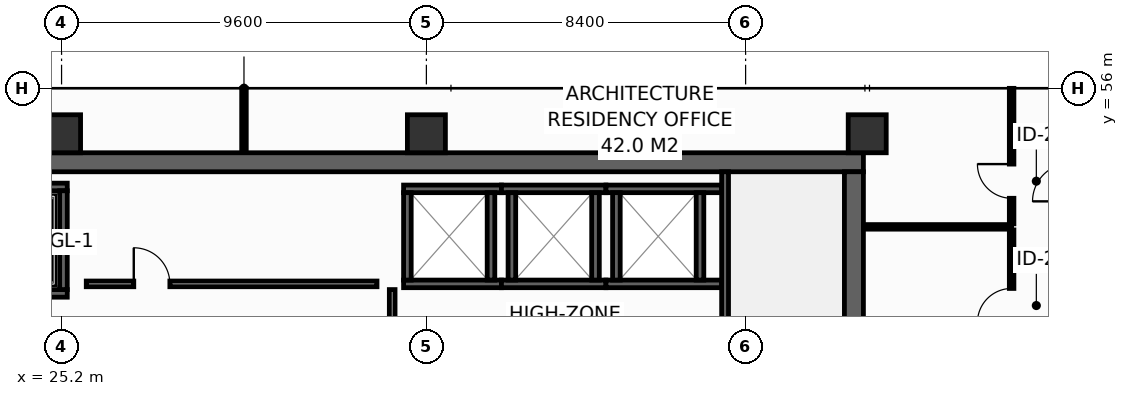
"""IFC4 building model, lengths in metres.
Left out: names, types, materials, properties, quantities, classifications, styles, units other than length and angle.
Written with IfcOpenShell. Run it as: python <this file> out.ifc"""

import sys

from ifc_helpers import new_model, si_unit, direction, frame, frame_2d, origin, origin_2d, place, context, subcontext, project, spatial, rectangle, hollow_rectangle, extrude, element, fill, save


model = new_model("IFC4")
c1 = context("Model", 3, precision=1e-05, world=origin(), true_north=direction((0.0, 1.0)))
c2 = subcontext(c1, "Body", "Model", "MODEL_VIEW")
j1 = project(units=[si_unit("LENGTHUNIT", "METRE"), si_unit("PLANEANGLEUNIT", "RADIAN")], contexts=[c1])
p1 = place(None, origin())
s1 = spatial("IfcSite", under=j1, at=p1, CompositionType="ELEMENT")
p2 = place(p1, origin())
s2 = spatial("IfcBuilding", under=s1, at=p2, CompositionType="ELEMENT")
p3 = place(p2, frame((0.0, 0.0, 160.0)))
s3 = spatial("IfcBuildingStorey", under=s2, at=p3, CompositionType="ELEMENT", Elevation=160.0)
p4 = place(p3, frame((13.6, 54.05, 0.0), z_axis=(0.0, 0.0, 1.0), x_axis=(1.0, 0.0, 0.0)))
e1 = element("IfcWall", 1, at=p4, inside=s3, PredefinedType="SHEAR", context=c2, shape_type="SweptSolid", body=[
    extrude(rectangle(XDim=32.7, YDim=0.5, at=frame_2d((16.35, 0.0))), origin(), (0.0, 0.0, 1.0), 3.55),
])
p5 = place(p3, frame((46.05, 43.4, 0.0), z_axis=(0.0, 0.0, 1.0), x_axis=(0.0, 1.0, 0.0)))
e2 = element("IfcWall", 2, at=p5, inside=s3, PredefinedType="SHEAR", context=c2, shape_type="SweptSolid", body=[
    extrude(rectangle(XDim=10.4, YDim=0.5, at=frame_2d((5.2, 0.0))), origin(), (0.0, 0.0, 1.0), 3.55),
])
for number, where, z_axis, x_axis in (
    (3, (25.2, 54.8, 0.0), (0.0, 0.0, 1.0), (1.0, 0.0, 0.0)),
    (4, (34.8, 54.8, 0.0), (0.0, 0.0, 1.0), (1.0, 0.0, 0.0)),
    (5, (46.4, 54.8, 0.0), (0.0, 0.0, 1.0), (1.0, 0.0, 0.0)),
):
    element("IfcColumn", number, at=place(p3, frame(where, z_axis=z_axis, x_axis=x_axis)), inside=s3, PredefinedType="COLUMN", context=c2, shape_type="SweptSolid", body=[
        extrude(hollow_rectangle(XDim=1.0, YDim=1.0, WallThickness=0.045, at=origin_2d()), origin(), (0.0, 0.0, 1.0), 3.8),
    ])
p6 = place(p3, frame((22.5, 50.6, 0.0), z_axis=(0.0, 0.0, 1.0), x_axis=(1.0, 0.0, 0.0)))
e6 = element("IfcWall", 6, at=p6, inside=s3, PredefinedType="SHEAR", context=c2, shape_type="SweptSolid", body=[
    extrude(rectangle(XDim=2.85, YDim=0.2, at=frame_2d((1.425, 0.0))), origin(), (0.0, 0.0, 1.0), 3.55),
])
p7 = place(p6, frame((0.925, 0.0, 0.0)))
e7 = element("IfcOpeningElement", 7, at=p7, cuts=e6, PredefinedType="OPENING", context=c2, shape_type="SweptSolid", body=[
    extrude(rectangle(XDim=1.25, YDim=2.3, at=frame_2d((0.625, 1.15))), frame((0.0, 0.11, 0.0), z_axis=(0.0, -1.0, 0.0), x_axis=(1.0, 0.0, 0.0)), (0.0, 0.0, 1.0), 0.22),
])
p8 = place(p3, frame((22.5, 53.4, 0.0), z_axis=(0.0, 0.0, 1.0), x_axis=(1.0, 0.0, 0.0)))
e8 = element("IfcWall", 8, at=p8, inside=s3, PredefinedType="SHEAR", context=c2, shape_type="SweptSolid", body=[
    extrude(rectangle(XDim=2.85, YDim=0.2, at=frame_2d((1.425, 0.0))), origin(), (0.0, 0.0, 1.0), 3.55),
])
p9 = place(p3, frame((25.25, 50.7, 0.0), z_axis=(0.0, 0.0, 1.0), x_axis=(0.0, 1.0, 0.0)))
e9 = element("IfcWall", 9, at=p9, inside=s3, PredefinedType="SHEAR", context=c2, shape_type="SweptSolid", body=[
    extrude(rectangle(XDim=2.6, YDim=0.2, at=frame_2d((1.3, 0.0))), origin(), (0.0, 0.0, 1.0), 3.55),
])
for number, where, z_axis, x_axis in (
    (10, (34.2, 50.85, 0.0), (0.0, 0.0, 1.0), (1.0, 0.0, 0.0)),
    (11, (34.2, 53.35, 0.0), (0.0, 0.0, 1.0), (1.0, 0.0, 0.0)),
):
    element("IfcWall", number, at=place(p3, frame(where, z_axis=z_axis, x_axis=x_axis)), inside=s3, PredefinedType="SHEAR", context=c2, shape_type="SweptSolid", body=[
        extrude(rectangle(XDim=2.575, YDim=0.2, at=frame_2d((1.288, 0.0))), origin(), (0.0, 0.0, 1.0), 3.55),
    ])
for number, where, z_axis, x_axis in (
    (12, (34.3, 50.95, 0.0), (0.0, 0.0, 1.0), (0.0, 1.0, 0.0)),
    (13, (36.5, 50.95, 0.0), (0.0, 0.0, 1.0), (0.0, 1.0, 0.0)),
):
    element("IfcWall", number, at=place(p3, frame(where, z_axis=z_axis, x_axis=x_axis)), inside=s3, PredefinedType="SHEAR", context=c2, shape_type="SweptSolid", body=[
        extrude(rectangle(XDim=2.3, YDim=0.2, at=frame_2d((1.15, 0.0))), origin(), (0.0, 0.0, 1.0), 3.55),
    ])
for number, where, z_axis, x_axis in (
    (14, (36.775, 50.85, 0.0), (0.0, 0.0, 1.0), (1.0, 0.0, 0.0)),
    (15, (36.775, 53.35, 0.0), (0.0, 0.0, 1.0), (1.0, 0.0, 0.0)),
):
    element("IfcWall", number, at=place(p3, frame(where, z_axis=z_axis, x_axis=x_axis)), inside=s3, PredefinedType="SHEAR", context=c2, shape_type="SweptSolid", body=[
        extrude(rectangle(XDim=2.75, YDim=0.2, at=frame_2d((1.375, 0.0))), origin(), (0.0, 0.0, 1.0), 3.55),
    ])
for number, where, z_axis, x_axis in (
    (16, (37.05, 50.95, 0.0), (0.0, 0.0, 1.0), (0.0, 1.0, 0.0)),
    (17, (39.25, 50.95, 0.0), (0.0, 0.0, 1.0), (0.0, 1.0, 0.0)),
):
    element("IfcWall", number, at=place(p3, frame(where, z_axis=z_axis, x_axis=x_axis)), inside=s3, PredefinedType="SHEAR", context=c2, shape_type="SweptSolid", body=[
        extrude(rectangle(XDim=2.3, YDim=0.2, at=frame_2d((1.15, 0.0))), origin(), (0.0, 0.0, 1.0), 3.55),
    ])
for number, where, z_axis, x_axis in (
    (18, (39.525, 50.85, 0.0), (0.0, 0.0, 1.0), (1.0, 0.0, 0.0)),
    (19, (39.525, 53.35, 0.0), (0.0, 0.0, 1.0), (1.0, 0.0, 0.0)),
):
    element("IfcWall", number, at=place(p3, frame(where, z_axis=z_axis, x_axis=x_axis)), inside=s3, PredefinedType="SHEAR", context=c2, shape_type="SweptSolid", body=[
        extrude(rectangle(XDim=3.045, YDim=0.2, at=frame_2d((1.522, 0.0))), origin(), (0.0, 0.0, 1.0), 3.55),
    ])
for number, where, z_axis, x_axis in (
    (20, (39.8, 50.95, 0.0), (0.0, 0.0, 1.0), (0.0, 1.0, 0.0)),
    (21, (42.0, 50.95, 0.0), (0.0, 0.0, 1.0), (0.0, 1.0, 0.0)),
):
    element("IfcWall", number, at=place(p3, frame(where, z_axis=z_axis, x_axis=x_axis)), inside=s3, PredefinedType="SHEAR", context=c2, shape_type="SweptSolid", body=[
        extrude(rectangle(XDim=2.3, YDim=0.2, at=frame_2d((1.15, 0.0))), origin(), (0.0, 0.0, 1.0), 3.55),
    ])
p10 = place(p3, frame((42.66, 53.8, 0.0), z_axis=(0.0, 0.0, 1.0), x_axis=(0.0, -1.0, 0.0)))
e22 = element("IfcWall", 22, at=p10, inside=s3, PredefinedType="SHEAR", context=c2, shape_type="SweptSolid", body=[
    extrude(rectangle(XDim=10.4, YDim=0.18, at=frame_2d((5.2, 0.0))), origin(), (0.0, 0.0, 1.0), 3.55),
])
p11 = place(p10, frame((8.99, 0.0, 0.0)))
e23 = element("IfcOpeningElement", 23, at=p11, cuts=e22, PredefinedType="OPENING", context=c2, shape_type="SweptSolid", body=[
    extrude(rectangle(XDim=1.1, YDim=2.15, at=frame_2d((0.55, 1.075))), frame((0.0, 0.1, 0.0), z_axis=(0.0, -1.0, 0.0), x_axis=(1.0, 0.0, 0.0)), (0.0, 0.0, 1.0), 0.2),
])
p12 = place(p3, frame((33.9, 47.95, 0.0), z_axis=(0.0, 0.0, 1.0), x_axis=(0.0, 1.0, 0.0)))
e24 = element("IfcWall", 24, at=p12, inside=s3, PredefinedType="PARTITIONING", context=c2, shape_type="SweptSolid", body=[
    extrude(rectangle(XDim=2.75, YDim=0.15, at=frame_2d((1.375, 0.0))), origin(), (0.0, 0.0, 1.0), 3.55),
])
p13 = place(p12, frame((0.85, 0.0, 0.0)))
e25 = element("IfcOpeningElement", 25, at=p13, cuts=e24, PredefinedType="OPENING", context=c2, shape_type="SweptSolid", body=[
    extrude(rectangle(XDim=1.05, YDim=2.15, at=frame_2d((0.525, 1.075))), frame((0.0, 0.085, 0.0), z_axis=(0.0, -1.0, 0.0), x_axis=(1.0, 0.0, 0.0)), (0.0, 0.0, 1.0), 0.17),
])
p14 = place(p3, frame((25.85, 50.85, 0.0), z_axis=(0.0, 0.0, 1.0), x_axis=(1.0, 0.0, 0.0)))
e26 = element("IfcWall", 26, at=p14, inside=s3, PredefinedType="PARTITIONING", context=c2, shape_type="SweptSolid", body=[
    extrude(rectangle(XDim=7.65, YDim=0.15, at=frame_2d((3.825, 0.0))), origin(), (0.0, 0.0, 1.0), 3.55),
])
p15 = place(p14, frame((1.25, 0.0, 0.0)))
e27 = element("IfcOpeningElement", 27, at=p15, cuts=e26, PredefinedType="OPENING", context=c2, shape_type="SweptSolid", body=[
    extrude(rectangle(XDim=0.95, YDim=2.15, at=frame_2d((0.475, 1.075))), frame((0.0, 0.085, 0.0), z_axis=(0.0, -1.0, 0.0), x_axis=(1.0, 0.0, 0.0)), (0.0, 0.0, 1.0), 0.17),
])
p16 = place(p3, frame((46.32, 52.35, 0.0), z_axis=(0.0, 0.0, 1.0), x_axis=(1.0, 0.0, 0.0)))
e28 = element("IfcWall", 28, at=p16, inside=s3, PredefinedType="PARTITIONING", context=c2, shape_type="SweptSolid", body=[
    extrude(rectangle(XDim=3.88, YDim=0.12, at=frame_2d((1.94, 0.0))), origin(), (0.0, 0.0, 1.0), 3.55),
])
p17 = place(p3, frame((30.0, 54.32, 0.0), z_axis=(0.0, 0.0, 1.0), x_axis=(0.0, 1.0, 0.0)))
e29 = element("IfcWall", 29, at=p17, inside=s3, PredefinedType="PARTITIONING", context=c2, shape_type="SweptSolid", body=[
    extrude(rectangle(XDim=1.675, YDim=0.12, at=frame_2d((0.837, 0.0))), origin(), (0.0, 0.0, 1.0), 2.935),
])
p18 = place(p3, frame((50.2, 48.29, 0.0), z_axis=(0.0, 0.0, 1.0), x_axis=(0.0, 1.0, 0.0)))
e30 = element("IfcWall", 30, at=p18, inside=s3, PredefinedType="PARTITIONING", context=c2, shape_type="SweptSolid", body=[
    extrude(rectangle(XDim=3.98, YDim=0.12, at=frame_2d((1.99, 0.0))), origin(), (0.0, 0.0, 1.0), 3.55),
])
p19 = place(p18, frame((1.54, 0.0, 0.0)))
e31 = element("IfcOpeningElement", 31, at=p19, cuts=e30, PredefinedType="OPENING", context=c2, shape_type="SweptSolid", body=[
    extrude(rectangle(XDim=0.9, YDim=2.1, at=frame_2d((0.45, 1.05))), frame((0.0, 0.07, 0.0), z_axis=(0.0, -1.0, 0.0), x_axis=(1.0, 0.0, 0.0)), (0.0, 0.0, 1.0), 0.14),
])
p20 = place(p3, frame((50.2, 52.43, 0.0), z_axis=(0.0, 0.0, 1.0), x_axis=(0.0, 1.0, 0.0)))
e32 = element("IfcWall", 32, at=p20, inside=s3, PredefinedType="PARTITIONING", context=c2, shape_type="SweptSolid", body=[
    extrude(rectangle(XDim=3.565, YDim=0.12, at=frame_2d((1.783, 0.0))), origin(), (0.0, 0.0, 1.0), 2.935),
])
p21 = place(p20, frame((0.672, 0.0, 0.0)))
e33 = element("IfcOpeningElement", 33, at=p21, cuts=e32, PredefinedType="OPENING", context=c2, shape_type="SweptSolid", body=[
    extrude(rectangle(XDim=0.9, YDim=2.1, at=frame_2d((0.45, 1.05))), frame((0.0, 0.07, 0.0), z_axis=(0.0, -1.0, 0.0), x_axis=(1.0, 0.0, 0.0)), (0.0, 0.0, 1.0), 0.14),
])
p22 = place(p15, origin())
e34 = element("IfcDoor", 34, at=p22, inside=s3, OperationType="SINGLE_SWING_LEFT", PredefinedType="DOOR", context=c2, shape_type="SweptSolid", body=[
    extrude(rectangle(XDim=0.95, YDim=2.15, at=frame_2d((0.475, 1.075))), frame((0.0, 0.025, 0.0), z_axis=(0.0, -1.0, 0.0), x_axis=(1.0, 0.0, 0.0)), (0.0, 0.0, 1.0), 0.05),
])
fill(e27, e34)
p23 = place(p19, origin())
e35 = element("IfcDoor", 35, at=p23, inside=s3, OperationType="SINGLE_SWING_LEFT", PredefinedType="DOOR", context=c2, shape_type="SweptSolid", body=[
    extrude(rectangle(XDim=0.9, YDim=2.1, at=frame_2d((0.45, 1.05))), frame((0.0, 0.025, 0.0), z_axis=(0.0, -1.0, 0.0), x_axis=(1.0, 0.0, 0.0)), (0.0, 0.0, 1.0), 0.05),
])
fill(e31, e35)
p24 = place(p21, origin())
e36 = element("IfcDoor", 36, at=p24, inside=s3, OperationType="SINGLE_SWING_RIGHT", PredefinedType="DOOR", context=c2, shape_type="SweptSolid", body=[
    extrude(rectangle(XDim=0.9, YDim=2.1, at=frame_2d((0.45, 1.05))), frame((0.0, 0.025, 0.0), z_axis=(0.0, -1.0, 0.0), x_axis=(1.0, 0.0, 0.0)), (0.0, 0.0, 1.0), 0.05),
])
fill(e33, e36)
save(model, sys.argv[1])
